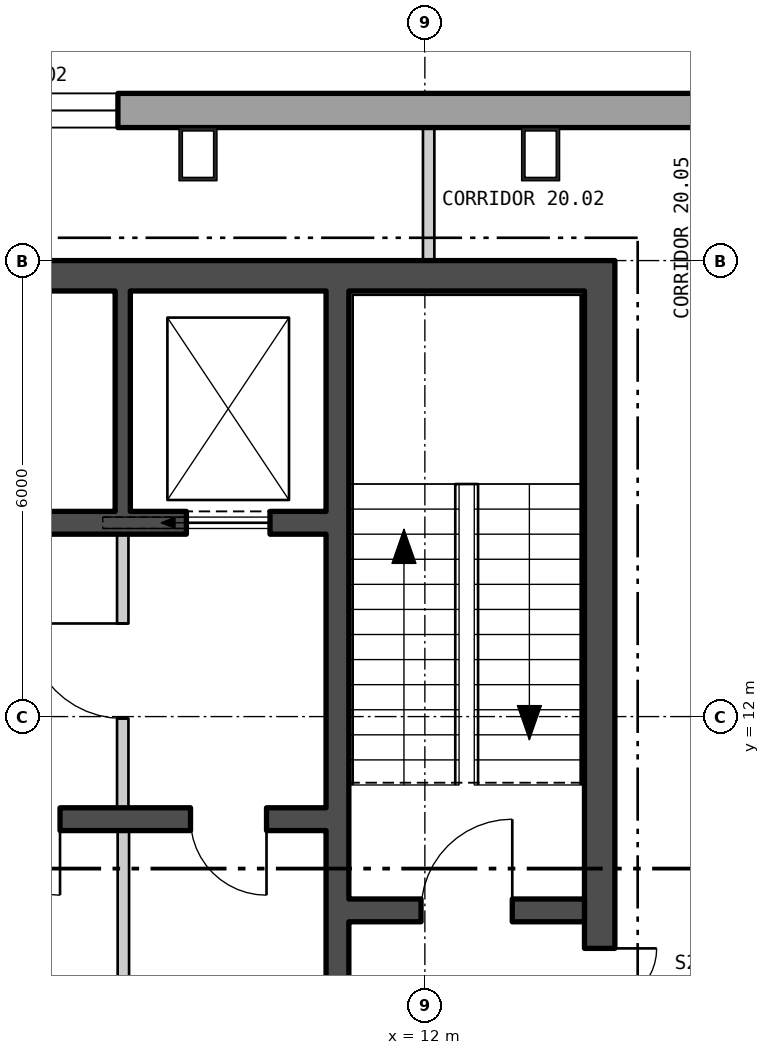
"""IFC4 building model, lengths in metres.
Left out: names, types, materials, properties, quantities, classifications, styles, units other than length and angle.
Written with IfcOpenShell. Run it as: python <this file> out.ifc"""

import sys

from ifc_helpers import new_model, si_unit, direction, frame, frame_2d, origin, origin_2d, place, context, subcontext, project, spatial, polyline, rectangle, hollow_rectangle, outline, extrude, element, fill, save


model = new_model("IFC4")
c1 = context("Model", 3, precision=1e-05, world=origin(), true_north=direction((0.0, 1.0)))
c2 = subcontext(c1, "Body", "Model", "MODEL_VIEW")
j1 = project(units=[si_unit("LENGTHUNIT", "METRE"), si_unit("PLANEANGLEUNIT", "RADIAN")], contexts=[c1])
p1 = place(None, origin())
s1 = spatial("IfcSite", under=j1, at=p1, CompositionType="ELEMENT")
p2 = place(p1, origin())
s2 = spatial("IfcBuilding", under=s1, at=p2, CompositionType="ELEMENT")
p3 = place(p2, frame((0.0, 0.0, 268.8)))
s3 = spatial("IfcBuildingStorey", under=s2, at=p3, CompositionType="ELEMENT", Elevation=268.8)
for number, where, z_axis, x_axis in (
    (1, (13.523, 19.4, 0.0), (0.0, 0.0, 1.0), (-1.0, 0.0, 0.0)),
    (2, (9.015, 19.4, 0.0), (0.0, 0.0, 1.0), (-1.0, 0.0, 0.0)),
):
    element("IfcColumn", number, at=place(p3, frame(where, z_axis=z_axis, x_axis=x_axis)), inside=s3, PredefinedType="COLUMN", context=c2, shape_type="SweptSolid", body=[
        extrude(hollow_rectangle(XDim=0.5, YDim=0.7, WallThickness=0.045, at=origin_2d()), origin(), (0.0, 0.0, 1.0), 3.9),
    ])
p4 = place(p3, frame((22.87, 19.975, -0.4), z_axis=(0.0, 0.0, 1.0), x_axis=(-1.0, 0.0, 0.0)))
e3 = element("IfcWall", 3, at=p4, inside=s3, PredefinedType="SOLIDWALL", context=c2, shape_type="SweptSolid", body=[
    extrude(outline(polyline([(-0.13, -0.225), (45.87, -0.225), (45.61, 0.225), (0.13, 0.225), (-0.13, -0.225)])), origin(), (0.0, 0.0, 1.0), 3.9),
])
p5 = place(p4, frame((1.424, 0.0, 1.3)))
e4 = element("IfcOpeningElement", 4, at=p5, cuts=e3, PredefinedType="OPENING", context=c2, shape_type="SweptSolid", body=[
    extrude(rectangle(XDim=2.4, YDim=2.0, at=frame_2d((1.2, 1.0))), frame((0.0, 0.235, 0.0), z_axis=(0.0, -1.0, 0.0), x_axis=(1.0, 0.0, 0.0)), (0.0, 0.0, 1.0), 0.47),
])
p6 = place(p4, frame((14.909, 0.0, 1.3)))
e5 = element("IfcOpeningElement", 5, at=p6, cuts=e3, PredefinedType="OPENING", context=c2, shape_type="SweptSolid", body=[
    extrude(rectangle(XDim=2.4, YDim=2.0, at=frame_2d((1.2, 1.0))), frame((0.0, 0.235, 0.0), z_axis=(0.0, -1.0, 0.0), x_axis=(1.0, 0.0, 0.0)), (0.0, 0.0, 1.0), 0.47),
])
p7 = place(p4, frame((19.416, 0.0, 1.3)))
e6 = element("IfcOpeningElement", 6, at=p7, cuts=e3, PredefinedType="OPENING", context=c2, shape_type="SweptSolid", body=[
    extrude(rectangle(XDim=2.4, YDim=2.0, at=frame_2d((1.2, 1.0))), frame((0.0, 0.235, 0.0), z_axis=(0.0, -1.0, 0.0), x_axis=(1.0, 0.0, 0.0)), (0.0, 0.0, 1.0), 0.47),
])
p8 = place(p4, frame((23.924, 0.0, 1.3)))
e7 = element("IfcOpeningElement", 7, at=p8, cuts=e3, PredefinedType="OPENING", context=c2, shape_type="SweptSolid", body=[
    extrude(rectangle(XDim=2.4, YDim=2.0, at=frame_2d((1.2, 1.0))), frame((0.0, 0.235, 0.0), z_axis=(0.0, -1.0, 0.0), x_axis=(1.0, 0.0, 0.0)), (0.0, 0.0, 1.0), 0.47),
])
p9 = place(p4, frame((28.431, 0.0, 1.3)))
e8 = element("IfcOpeningElement", 8, at=p9, cuts=e3, PredefinedType="OPENING", context=c2, shape_type="SweptSolid", body=[
    extrude(rectangle(XDim=2.4, YDim=2.0, at=frame_2d((1.2, 1.0))), frame((0.0, 0.235, 0.0), z_axis=(0.0, -1.0, 0.0), x_axis=(1.0, 0.0, 0.0)), (0.0, 0.0, 1.0), 0.47),
])
p10 = place(p4, frame((32.939, 0.0, 1.3)))
e9 = element("IfcOpeningElement", 9, at=p10, cuts=e3, PredefinedType="OPENING", context=c2, shape_type="SweptSolid", body=[
    extrude(rectangle(XDim=2.4, YDim=2.0, at=frame_2d((1.2, 1.0))), frame((0.0, 0.235, 0.0), z_axis=(0.0, -1.0, 0.0), x_axis=(1.0, 0.0, 0.0)), (0.0, 0.0, 1.0), 0.47),
])
p11 = place(p4, frame((41.916, 0.0, 1.3)))
e10 = element("IfcOpeningElement", 10, at=p11, cuts=e3, PredefinedType="OPENING", context=c2, shape_type="SweptSolid", body=[
    extrude(rectangle(XDim=2.4, YDim=2.0, at=frame_2d((1.2, 1.0))), frame((0.0, 0.235, 0.0), z_axis=(0.0, -1.0, 0.0), x_axis=(1.0, 0.0, 0.0)), (0.0, 0.0, 1.0), 0.47),
])
p12 = place(p3, frame((2.67, -24.262, -0.18), z_axis=(0.0, 0.0, 1.0), x_axis=(0.499999764979, 0.866025539474, 0.0)))
e11 = element("IfcWall", 11, at=p12, inside=s3, PredefinedType="SOLIDWALL", context=c2, shape_type="SweptSolid", body=[
    extrude(outline(polyline([(-0.13, -0.225), (45.87, -0.225), (45.61, 0.225), (0.13, 0.225), (-0.13, -0.225)])), origin(), (0.0, 0.0, 1.0), 3.68),
])
p13 = place(p12, frame((1.424, 0.0, 1.08)))
e12 = element("IfcOpeningElement", 12, at=p13, cuts=e11, PredefinedType="OPENING", context=c2, shape_type="SweptSolid", body=[
    extrude(rectangle(XDim=2.4, YDim=2.0, at=frame_2d((1.2, 1.0))), frame((0.0, 0.235, 0.0), z_axis=(0.0, -1.0, 0.0), x_axis=(1.0, 0.0, 0.0)), (0.0, 0.0, 1.0), 0.47),
])
p14 = place(p12, frame((5.893, 0.0, 1.08)))
e13 = element("IfcOpeningElement", 13, at=p14, cuts=e11, PredefinedType="OPENING", context=c2, shape_type="SweptSolid", body=[
    extrude(rectangle(XDim=2.4, YDim=2.0, at=frame_2d((1.2, 1.0))), frame((0.0, 0.235, 0.0), z_axis=(0.0, -1.0, 0.0), x_axis=(1.0, 0.0, 0.0)), (0.0, 0.0, 1.0), 0.47),
])
p15 = place(p12, frame((10.401, 0.0, 1.08)))
e14 = element("IfcOpeningElement", 14, at=p15, cuts=e11, PredefinedType="OPENING", context=c2, shape_type="SweptSolid", body=[
    extrude(rectangle(XDim=2.4, YDim=2.0, at=frame_2d((1.2, 1.0))), frame((0.0, 0.235, 0.0), z_axis=(0.0, -1.0, 0.0), x_axis=(1.0, 0.0, 0.0)), (0.0, 0.0, 1.0), 0.47),
])
p16 = place(p12, frame((14.909, 0.0, 1.08)))
e15 = element("IfcOpeningElement", 15, at=p16, cuts=e11, PredefinedType="OPENING", context=c2, shape_type="SweptSolid", body=[
    extrude(rectangle(XDim=2.4, YDim=2.0, at=frame_2d((1.2, 1.0))), frame((0.0, 0.235, 0.0), z_axis=(0.0, -1.0, 0.0), x_axis=(1.0, 0.0, 0.0)), (0.0, 0.0, 1.0), 0.47),
])
p17 = place(p12, frame((23.924, 0.0, 1.08)))
e16 = element("IfcOpeningElement", 16, at=p17, cuts=e11, PredefinedType="OPENING", context=c2, shape_type="SweptSolid", body=[
    extrude(rectangle(XDim=2.4, YDim=2.0, at=frame_2d((1.2, 1.0))), frame((0.0, 0.235, 0.0), z_axis=(0.0, -1.0, 0.0), x_axis=(1.0, 0.0, 0.0)), (0.0, 0.0, 1.0), 0.47),
])
p18 = place(p12, frame((28.431, 0.0, 1.08)))
e17 = element("IfcOpeningElement", 17, at=p18, cuts=e11, PredefinedType="OPENING", context=c2, shape_type="SweptSolid", body=[
    extrude(rectangle(XDim=2.4, YDim=2.0, at=frame_2d((1.2, 1.0))), frame((0.0, 0.235, 0.0), z_axis=(0.0, -1.0, 0.0), x_axis=(1.0, 0.0, 0.0)), (0.0, 0.0, 1.0), 0.47),
])
p19 = place(p12, frame((32.939, 0.0, 1.08)))
e18 = element("IfcOpeningElement", 18, at=p19, cuts=e11, PredefinedType="OPENING", context=c2, shape_type="SweptSolid", body=[
    extrude(rectangle(XDim=2.4, YDim=2.0, at=frame_2d((1.2, 1.0))), frame((0.0, 0.235, 0.0), z_axis=(0.0, -1.0, 0.0), x_axis=(1.0, 0.0, 0.0)), (0.0, 0.0, 1.0), 0.47),
])
p20 = place(p12, frame((37.447, 0.0, 1.08)))
e19 = element("IfcOpeningElement", 19, at=p20, cuts=e11, PredefinedType="OPENING", context=c2, shape_type="SweptSolid", body=[
    extrude(rectangle(XDim=2.4, YDim=2.0, at=frame_2d((1.2, 1.0))), frame((0.0, 0.235, 0.0), z_axis=(0.0, -1.0, 0.0), x_axis=(1.0, 0.0, 0.0)), (0.0, 0.0, 1.0), 0.47),
])
p21 = place(p12, frame((41.916, 0.0, 1.08)))
e20 = element("IfcOpeningElement", 20, at=p21, cuts=e11, PredefinedType="OPENING", context=c2, shape_type="SweptSolid", body=[
    extrude(rectangle(XDim=2.4, YDim=2.0, at=frame_2d((1.2, 1.0))), frame((0.0, 0.235, 0.0), z_axis=(0.0, -1.0, 0.0), x_axis=(1.0, 0.0, 0.0)), (0.0, 0.0, 1.0), 0.47),
])
p22 = place(p3, frame((-14.5, 17.8, 0.0), z_axis=(0.0, 0.0, 1.0), x_axis=(1.0, 0.0, 0.0)))
e21 = element("IfcWall", 21, at=p22, inside=s3, PredefinedType="SHEAR", context=c2, shape_type="SweptSolid", body=[
    extrude(rectangle(XDim=29.0, YDim=0.4, at=frame_2d((14.5, 0.0))), origin(), (0.0, 0.0, 1.0), 3.7),
])
p23 = place(p3, frame((14.3, 4.4, 0.0), z_axis=(0.0, 0.0, 1.0), x_axis=(0.0, 1.0, 0.0)))
e22 = element("IfcWall", 22, at=p23, inside=s3, PredefinedType="SHEAR", context=c2, shape_type="SweptSolid", body=[
    extrude(rectangle(XDim=13.2, YDim=0.4, at=frame_2d((6.6, 0.0))), origin(), (0.0, 0.0, 1.0), 3.7),
])
p24 = place(p23, frame((3.05, 0.0, 0.0)))
e23 = element("IfcOpeningElement", 23, at=p24, cuts=e22, PredefinedType="OPENING", context=c2, shape_type="SweptSolid", body=[
    extrude(rectangle(XDim=1.5, YDim=2.1, at=frame_2d((0.75, 1.05))), frame((0.0, 0.21, 0.0), z_axis=(0.0, -1.0, 0.0), x_axis=(1.0, 0.0, 0.0)), (0.0, 0.0, 1.0), 0.42),
])
p25 = place(p3, frame((10.85, 4.4, 0.0), z_axis=(0.0, 0.0, 1.0), x_axis=(0.0, 1.0, 0.0)))
e24 = element("IfcWall", 24, at=p25, inside=s3, PredefinedType="SHEAR", context=c2, shape_type="SweptSolid", body=[
    extrude(rectangle(XDim=13.2, YDim=0.3, at=frame_2d((6.6, 0.0))), origin(), (0.0, 0.0, 1.0), 3.7),
])
p26 = place(p25, frame((1.575, 0.0, 0.0)))
e25 = element("IfcOpeningElement", 25, at=p26, cuts=e24, PredefinedType="OPENING", context=c2, shape_type="SweptSolid", body=[
    extrude(rectangle(XDim=1.25, YDim=2.1, at=frame_2d((0.625, 1.05))), frame((0.0, 0.16, 0.0), z_axis=(0.0, -1.0, 0.0), x_axis=(1.0, 0.0, 0.0)), (0.0, 0.0, 1.0), 0.32),
])
p27 = place(p25, frame((0.4, 0.0, 0.0)))
e26 = element("IfcOpeningElement", 26, at=p27, cuts=e24, PredefinedType="OPENING", context=c2, shape_type="SweptSolid", body=[
    extrude(rectangle(XDim=0.9, YDim=2.1, at=frame_2d((0.45, 1.05))), frame((0.0, 0.16, 0.0), z_axis=(0.0, -1.0, 0.0), x_axis=(1.0, 0.0, 0.0)), (0.0, 0.0, 1.0), 0.32),
])
p28 = place(p3, frame((11.0, 9.45, 0.0), z_axis=(0.0, 0.0, 1.0), x_axis=(1.0, 0.0, 0.0)))
e27 = element("IfcWall", 27, at=p28, inside=s3, PredefinedType="SHEAR", context=c2, shape_type="SweptSolid", body=[
    extrude(rectangle(XDim=3.1, YDim=0.3, at=frame_2d((1.55, 0.0))), origin(), (0.0, 0.0, 1.0), 3.7),
])
p29 = place(p28, frame((0.95, 0.0, 0.0)))
e28 = element("IfcOpeningElement", 28, at=p29, cuts=e27, PredefinedType="OPENING", context=c2, shape_type="SweptSolid", body=[
    extrude(rectangle(XDim=1.2, YDim=2.1, at=frame_2d((0.6, 1.05))), frame((0.0, 0.16, 0.0), z_axis=(0.0, -1.0, 0.0), x_axis=(1.0, 0.0, 0.0)), (0.0, 0.0, 1.0), 0.32),
])
p30 = place(p3, frame((-10.7, 14.55, 0.0), z_axis=(0.0, 0.0, 1.0), x_axis=(1.0, 0.0, 0.0)))
e29 = element("IfcWall", 29, at=p30, inside=s3, PredefinedType="SHEAR", context=c2, shape_type="SweptSolid", body=[
    extrude(rectangle(XDim=21.4, YDim=0.3, at=frame_2d((10.7, 0.0))), origin(), (0.0, 0.0, 1.0), 3.7),
])
p31 = place(p30, frame((0.738, 0.0, 0.0)))
e30 = element("IfcOpeningElement", 30, at=p31, cuts=e29, PredefinedType="OPENING", context=c2, shape_type="SweptSolid", body=[
    extrude(rectangle(XDim=1.1, YDim=2.1, at=frame_2d((0.55, 1.05))), frame((0.0, 0.16, 0.0), z_axis=(0.0, -1.0, 0.0), x_axis=(1.0, 0.0, 0.0)), (0.0, 0.0, 1.0), 0.32),
])
p32 = place(p30, frame((3.462, 0.0, 0.0)))
e31 = element("IfcOpeningElement", 31, at=p32, cuts=e29, PredefinedType="OPENING", context=c2, shape_type="SweptSolid", body=[
    extrude(rectangle(XDim=1.1, YDim=2.1, at=frame_2d((0.55, 1.05))), frame((0.0, 0.16, 0.0), z_axis=(0.0, -1.0, 0.0), x_axis=(1.0, 0.0, 0.0)), (0.0, 0.0, 1.0), 0.32),
])
p33 = place(p30, frame((6.138, 0.0, 0.0)))
e32 = element("IfcOpeningElement", 32, at=p33, cuts=e29, PredefinedType="OPENING", context=c2, shape_type="SweptSolid", body=[
    extrude(rectangle(XDim=1.1, YDim=2.1, at=frame_2d((0.55, 1.05))), frame((0.0, 0.16, 0.0), z_axis=(0.0, -1.0, 0.0), x_axis=(1.0, 0.0, 0.0)), (0.0, 0.0, 1.0), 0.32),
])
p34 = place(p30, frame((8.812, 0.0, 0.0)))
e33 = element("IfcOpeningElement", 33, at=p34, cuts=e29, PredefinedType="OPENING", context=c2, shape_type="SweptSolid", body=[
    extrude(rectangle(XDim=1.1, YDim=2.1, at=frame_2d((0.55, 1.05))), frame((0.0, 0.16, 0.0), z_axis=(0.0, -1.0, 0.0), x_axis=(1.0, 0.0, 0.0)), (0.0, 0.0, 1.0), 0.32),
])
p35 = place(p30, frame((19.562, 0.0, 0.0)))
e34 = element("IfcOpeningElement", 34, at=p35, cuts=e29, PredefinedType="OPENING", context=c2, shape_type="SweptSolid", body=[
    extrude(rectangle(XDim=1.1, YDim=2.1, at=frame_2d((0.55, 1.05))), frame((0.0, 0.16, 0.0), z_axis=(0.0, -1.0, 0.0), x_axis=(1.0, 0.0, 0.0)), (0.0, 0.0, 1.0), 0.32),
])
p36 = place(p30, frame((14.213, 0.0, 0.0)))
e35 = element("IfcOpeningElement", 35, at=p36, cuts=e29, PredefinedType="OPENING", context=c2, shape_type="SweptSolid", body=[
    extrude(rectangle(XDim=1.0, YDim=2.1, at=frame_2d((0.5, 1.05))), frame((0.0, 0.16, 0.0), z_axis=(0.0, -1.0, 0.0), x_axis=(1.0, 0.0, 0.0)), (0.0, 0.0, 1.0), 0.32),
])
p37 = place(p3, frame((2.6, 10.65, 0.0), z_axis=(0.0, 0.0, 1.0), x_axis=(1.0, 0.0, 0.0)))
e36 = element("IfcWall", 36, at=p37, inside=s3, PredefinedType="SHEAR", context=c2, shape_type="SweptSolid", body=[
    extrude(rectangle(XDim=8.1, YDim=0.3, at=frame_2d((4.05, 0.0))), origin(), (0.0, 0.0, 1.0), 3.7),
])
p38 = place(p37, frame((0.933, 0.0, 0.0)))
e37 = element("IfcOpeningElement", 37, at=p38, cuts=e36, PredefinedType="OPENING", context=c2, shape_type="SweptSolid", body=[
    extrude(rectangle(XDim=1.0, YDim=2.1, at=frame_2d((0.5, 1.05))), frame((0.0, 0.16, 0.0), z_axis=(0.0, -1.0, 0.0), x_axis=(1.0, 0.0, 0.0)), (0.0, 0.0, 1.0), 0.32),
])
p39 = place(p37, frame((3.6, 0.0, 0.0)))
e38 = element("IfcOpeningElement", 38, at=p39, cuts=e36, PredefinedType="OPENING", context=c2, shape_type="SweptSolid", body=[
    extrude(rectangle(XDim=1.0, YDim=2.1, at=frame_2d((0.5, 1.05))), frame((0.0, 0.16, 0.0), z_axis=(0.0, -1.0, 0.0), x_axis=(1.0, 0.0, 0.0)), (0.0, 0.0, 1.0), 0.32),
])
p40 = place(p37, frame((6.317, 0.0, 0.0)))
e39 = element("IfcOpeningElement", 39, at=p40, cuts=e36, PredefinedType="OPENING", context=c2, shape_type="SweptSolid", body=[
    extrude(rectangle(XDim=1.0, YDim=2.1, at=frame_2d((0.5, 1.05))), frame((0.0, 0.16, 0.0), z_axis=(0.0, -1.0, 0.0), x_axis=(1.0, 0.0, 0.0)), (0.0, 0.0, 1.0), 0.32),
])
p41 = place(p3, frame((8.025, 14.7, 0.0), z_axis=(0.0, 0.0, 1.0), x_axis=(0.0, 1.0, 0.0)))
e40 = element("IfcWall", 40, at=p41, inside=s3, PredefinedType="SHEAR", context=c2, shape_type="SweptSolid", body=[
    extrude(rectangle(XDim=2.9, YDim=0.2, at=frame_2d((1.45, 0.0))), origin(), (0.0, 0.0, 1.0), 3.7),
])
p42 = place(p3, frame((8.033, 7.8, 0.0), z_axis=(0.0, 0.0, 1.0), x_axis=(0.0, 1.0, 0.0)))
e41 = element("IfcWall", 41, at=p42, inside=s3, PredefinedType="PARTITIONING", context=c2, shape_type="SweptSolid", body=[
    extrude(rectangle(XDim=2.7, YDim=0.15, at=frame_2d((1.35, 0.0))), origin(), (0.0, 0.0, 1.0), 3.7),
])
p43 = place(p3, frame((8.025, 10.8, 0.0), z_axis=(0.0, 0.0, 1.0), x_axis=(0.0, 1.0, 0.0)))
e42 = element("IfcWall", 42, at=p43, inside=s3, PredefinedType="PARTITIONING", context=c2, shape_type="SweptSolid", body=[
    extrude(rectangle(XDim=3.6, YDim=0.15, at=frame_2d((1.8, 0.0))), origin(), (0.0, 0.0, 1.0), 3.7),
])
p44 = place(p43, frame((1.175, 0.0, 0.0)))
e43 = element("IfcOpeningElement", 43, at=p44, cuts=e42, PredefinedType="OPENING", context=c2, shape_type="SweptSolid", body=[
    extrude(rectangle(XDim=1.25, YDim=2.1, at=frame_2d((0.625, 1.05))), frame((0.0, 0.085, 0.0), z_axis=(0.0, -1.0, 0.0), x_axis=(1.0, 0.0, 0.0)), (0.0, 0.0, 1.0), 0.17),
])
p45 = place(p3, frame((12.05, 18.0, 0.0), z_axis=(0.0, 0.0, 1.0), x_axis=(0.0, 1.0, 0.0)))
e44 = element("IfcWall", 44, at=p45, inside=s3, PredefinedType="PARTITIONING", context=c2, shape_type="SweptSolid", body=[
    extrude(rectangle(XDim=1.75, YDim=0.15, at=frame_2d((0.875, 0.0))), origin(), (0.0, 0.0, 1.0), 3.7),
])
p46 = place(p6, origin())
e45 = element("IfcWindow", 45, at=p46, inside=s3, PartitioningType="SINGLE_PANEL", PredefinedType="WINDOW", context=c2, shape_type="SweptSolid", body=[
    extrude(rectangle(XDim=2.4, YDim=2.0, at=frame_2d((1.2, 1.0))), frame((0.0, 0.105, 0.0), z_axis=(0.0, -1.0, 0.0), x_axis=(1.0, 0.0, 0.0)), (0.0, 0.0, 1.0), 0.06),
])
fill(e5, e45)
p47 = place(p35, origin())
e46 = element("IfcDoor", 46, at=p47, inside=s3, OperationType="SLIDING_TO_LEFT", PredefinedType="DOOR", context=c2, shape_type="SweptSolid", body=[
    extrude(rectangle(XDim=1.1, YDim=2.1, at=frame_2d((0.55, 1.05))), frame((0.0, 0.025, 0.0), z_axis=(0.0, -1.0, 0.0), x_axis=(1.0, 0.0, 0.0)), (0.0, 0.0, 1.0), 0.05),
])
fill(e34, e46)
p48 = place(p39, origin())
e47 = element("IfcDoor", 47, at=p48, inside=s3, OperationType="SINGLE_SWING_RIGHT", PredefinedType="DOOR", context=c2, shape_type="SweptSolid", body=[
    extrude(rectangle(XDim=1.0, YDim=2.1, at=frame_2d((0.5, 1.05))), frame((0.0, 0.025, 0.0), z_axis=(0.0, -1.0, 0.0), x_axis=(1.0, 0.0, 0.0)), (0.0, 0.0, 1.0), 0.05),
])
fill(e38, e47)
p49 = place(p40, origin())
e48 = element("IfcDoor", 48, at=p49, inside=s3, OperationType="SINGLE_SWING_RIGHT", PredefinedType="DOOR", context=c2, shape_type="SweptSolid", body=[
    extrude(rectangle(XDim=1.0, YDim=2.1, at=frame_2d((0.5, 1.05))), frame((0.0, 0.025, 0.0), z_axis=(0.0, -1.0, 0.0), x_axis=(1.0, 0.0, 0.0)), (0.0, 0.0, 1.0), 0.05),
])
fill(e39, e48)
p50 = place(p44, origin())
e49 = element("IfcDoor", 49, at=p50, inside=s3, OperationType="SINGLE_SWING_LEFT", PredefinedType="DOOR", context=c2, shape_type="SweptSolid", body=[
    extrude(rectangle(XDim=1.25, YDim=2.1, at=frame_2d((0.625, 1.05))), frame((0.0, 0.025, 0.0), z_axis=(0.0, -1.0, 0.0), x_axis=(1.0, 0.0, 0.0)), (0.0, 0.0, 1.0), 0.05),
])
fill(e43, e49)
p51 = place(p29, origin())
e50 = element("IfcDoor", 50, at=p51, inside=s3, OperationType="SINGLE_SWING_LEFT", PredefinedType="DOOR", context=c2, shape_type="SweptSolid", body=[
    extrude(rectangle(XDim=1.2, YDim=2.1, at=frame_2d((0.6, 1.05))), frame((0.0, 0.025, 0.0), z_axis=(0.0, -1.0, 0.0), x_axis=(1.0, 0.0, 0.0)), (0.0, 0.0, 1.0), 0.05),
])
fill(e28, e50)
p52 = place(p24, origin())
e51 = element("IfcDoor", 51, at=p52, inside=s3, OperationType="DOUBLE_DOOR_SINGLE_SWING", PredefinedType="DOOR", context=c2, shape_type="SweptSolid", body=[
    extrude(rectangle(XDim=1.5, YDim=2.1, at=frame_2d((0.75, 1.05))), frame((0.0, 0.025, 0.0), z_axis=(0.0, -1.0, 0.0), x_axis=(1.0, 0.0, 0.0)), (0.0, 0.0, 1.0), 0.05),
])
fill(e23, e51)
save(model, sys.argv[1])
